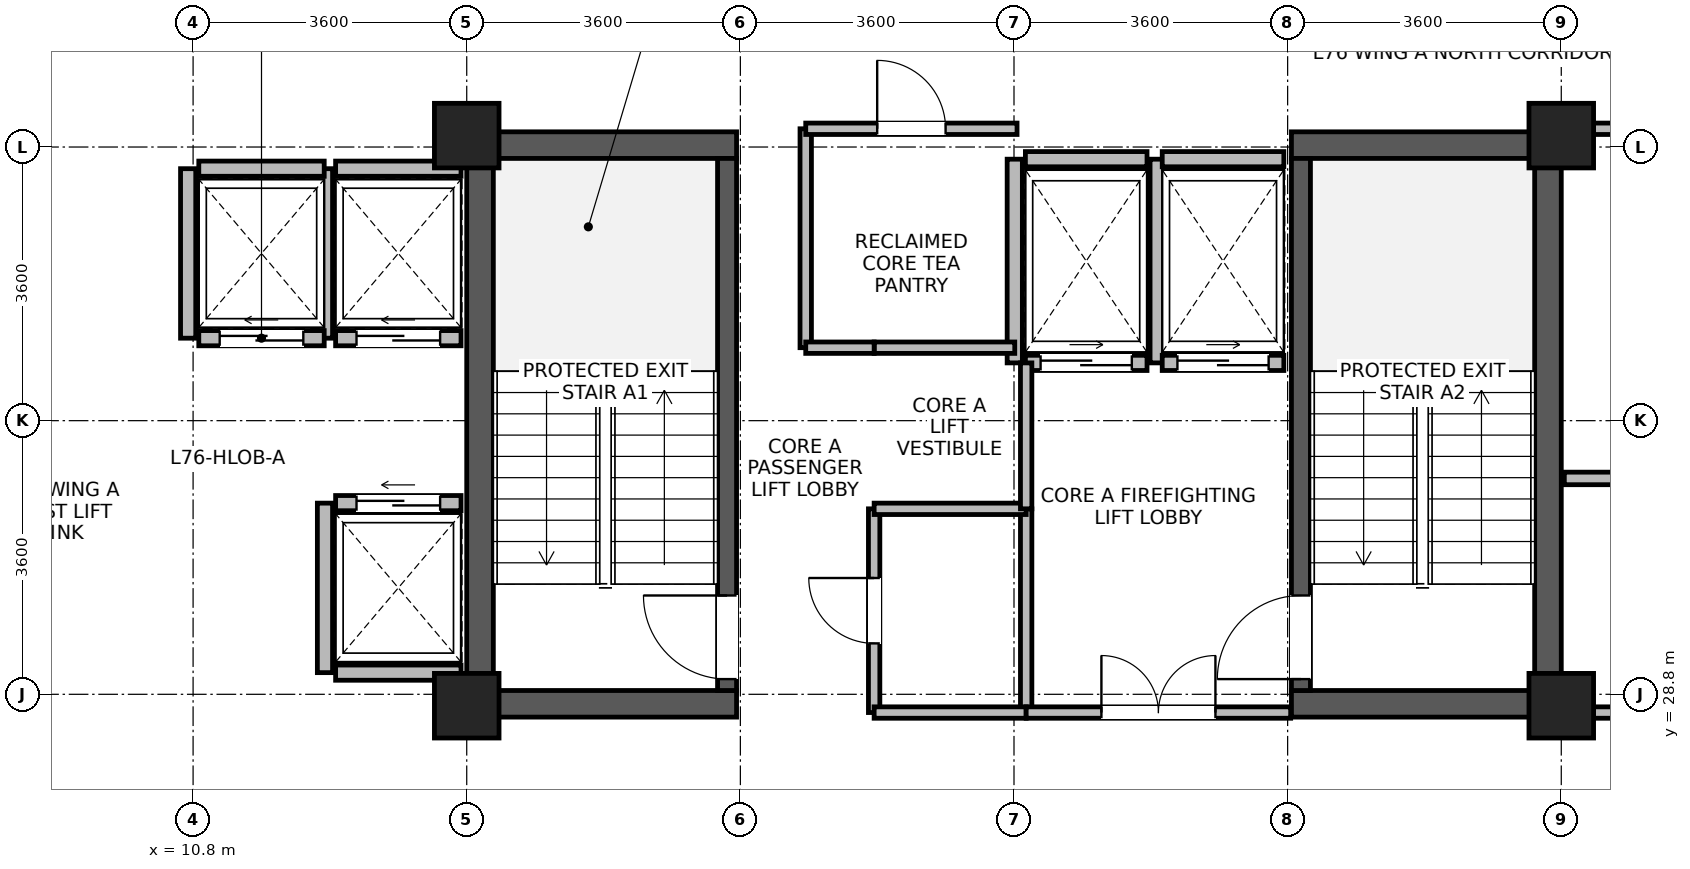
"""IFC4 building model, lengths in metres.
Left out: names, types, materials, properties, quantities, classifications, styles, units other than length and angle.
Written with IfcOpenShell. Run it as: python <this file> out.ifc"""

import sys

from ifc_helpers import new_model, si_unit, direction, frame, frame_2d, origin, origin_2d, place, context, subcontext, project, spatial, rectangle, extrude, source, transform, mapped, element, fill, save


model = new_model("IFC4")
c1 = context("Model", 3, precision=1e-05, world=origin(), true_north=direction((0.0, 1.0)))
c2 = subcontext(c1, "Body", "Model", "MODEL_VIEW")
j1 = project(units=[si_unit("LENGTHUNIT", "METRE"), si_unit("PLANEANGLEUNIT", "RADIAN")], contexts=[c1])
p1 = place(None, origin())
s1 = spatial("IfcSite", under=j1, at=p1, CompositionType="ELEMENT")
p2 = place(p1, origin())
s2 = spatial("IfcBuilding", under=s1, at=p2, CompositionType="ELEMENT")
p3 = place(p2, frame((0.0, 0.0, 294.3)))
s3 = spatial("IfcBuildingStorey", under=s2, at=p3, CompositionType="ELEMENT", Elevation=294.3)
for number, where, z_axis, x_axis in (
    (1, (14.575, 28.5, 0.0), (0.0, 0.0, 1.0), (0.0, 1.0, 0.0)),
    (2, (28.625, 28.5, 0.0), (0.0, 0.0, 1.0), (0.0, 1.0, 0.0)),
):
    element("IfcWall", number, at=place(p3, frame(where, z_axis=z_axis, x_axis=x_axis)), inside=s3, PredefinedType="SHEAR", context=c2, shape_type="SweptSolid", body=[
        extrude(rectangle(XDim=7.7, YDim=0.35, at=frame_2d((3.85, 0.0))), origin(), (0.0, 0.0, 1.0), 3.4),
    ])
for number, where, z_axis, x_axis in (
    (3, (14.75, 28.675, 0.0), (0.0, 0.0, 1.0), (1.0, 0.0, 0.0)),
    (4, (25.25, 28.675, 0.0), (0.0, 0.0, 1.0), (1.0, 0.0, 0.0)),
    (5, (14.75, 36.025, 0.0), (0.0, 0.0, 1.0), (1.0, 0.0, 0.0)),
    (6, (25.25, 36.025, 0.0), (0.0, 0.0, 1.0), (1.0, 0.0, 0.0)),
):
    element("IfcWall", number, at=place(p3, frame(where, z_axis=z_axis, x_axis=x_axis)), inside=s3, PredefinedType="SHEAR", context=c2, shape_type="SweptSolid", body=[
        extrude(rectangle(XDim=3.2, YDim=0.35, at=frame_2d((1.6, 0.0))), origin(), (0.0, 0.0, 1.0), 3.4),
    ])
p4 = place(p3, frame((17.825, 28.85, 0.0), z_axis=(0.0, 0.0, 1.0), x_axis=(0.0, 1.0, 0.0)))
e7 = element("IfcWall", 7, at=p4, inside=s3, PredefinedType="SHEAR", context=c2, shape_type="SweptSolid", body=[
    extrude(rectangle(XDim=7.0, YDim=0.25, at=frame_2d((3.5, 0.0))), origin(), (0.0, 0.0, 1.0), 3.4),
])
p5 = place(p4, frame((0.15, 0.0, 0.0)))
e8 = element("IfcOpeningElement", 8, at=p5, cuts=e7, PredefinedType="OPENING", context=c2, shape_type="SweptSolid", body=[
    extrude(rectangle(XDim=1.1, YDim=2.08, at=frame_2d((0.55, 1.04))), frame((0.0, 0.135, 0.0), z_axis=(0.0, -1.0, 0.0), x_axis=(1.0, 0.0, 0.0)), (0.0, 0.0, 1.0), 0.27),
])
p6 = place(p3, frame((25.375, 28.85, 0.0), z_axis=(0.0, 0.0, 1.0), x_axis=(0.0, 1.0, 0.0)))
e9 = element("IfcWall", 9, at=p6, inside=s3, PredefinedType="SHEAR", context=c2, shape_type="SweptSolid", body=[
    extrude(rectangle(XDim=7.0, YDim=0.25, at=frame_2d((3.5, 0.0))), origin(), (0.0, 0.0, 1.0), 3.4),
])
p7 = place(p6, frame((0.15, 0.0, 0.0)))
e10 = element("IfcOpeningElement", 10, at=p7, cuts=e9, PredefinedType="OPENING", context=c2, shape_type="SweptSolid", body=[
    extrude(rectangle(XDim=1.1, YDim=2.08, at=frame_2d((0.55, 1.04))), frame((0.0, 0.135, 0.0), z_axis=(0.0, -1.0, 0.0), x_axis=(1.0, 0.0, 0.0)), (0.0, 0.0, 1.0), 0.27),
])
m1 = source(origin(), c2, "Body", "SweptSolid", [
    extrude(rectangle(XDim=0.85, YDim=0.85, at=origin_2d()), origin(), (0.0, 0.0, 1.0), 3.7),
])
for number, where, z_axis, x_axis in (
    (11, (14.4, 28.65, 0.0), (0.0, 0.0, 1.0), (1.0, 0.0, 0.0)),
    (12, (14.4, 36.15, 0.0), (0.0, 0.0, 1.0), (1.0, 0.0, 0.0)),
    (13, (28.8, 28.65, 0.0), (0.0, 0.0, 1.0), (1.0, 0.0, 0.0)),
    (14, (28.8, 36.15, 0.0), (0.0, 0.0, 1.0), (1.0, 0.0, 0.0)),
):
    element("IfcColumn", number, at=place(p3, frame(where, z_axis=z_axis, x_axis=x_axis)), inside=s3, PredefinedType="COLUMN", context=c2, shape_type="MappedRepresentation", body=[
        mapped(m1, transform((0.0, 0.0, 0.0), x_axis=(1.0, 0.0, 0.0), y_axis=(0.0, 1.0, 0.0), z_axis=(0.0, 0.0, 1.0), scale=1.0)),
    ])
p8 = place(p3, frame((12.675, 33.485, 0.0), z_axis=(0.0, 0.0, 1.0), x_axis=(1.0, 0.0, 0.0)))
e15 = element("IfcWall", 15, at=p8, inside=s3, PredefinedType="PARTITIONING", context=c2, shape_type="SweptSolid", body=[
    extrude(rectangle(XDim=1.65, YDim=0.2, at=frame_2d((0.825, 0.0))), origin(), (0.0, 0.0, 1.0), 3.38),
])
p9 = place(p8, frame((0.275, 0.0, 0.0)))
e16 = element("IfcOpeningElement", 16, at=p9, cuts=e15, PredefinedType="OPENING", context=c2, shape_type="SweptSolid", body=[
    extrude(rectangle(XDim=1.1, YDim=2.12, at=frame_2d((0.55, 1.06))), frame((0.0, 0.11, 0.0), z_axis=(0.0, -1.0, 0.0), x_axis=(1.0, 0.0, 0.0)), (0.0, 0.0, 1.0), 0.22),
])
p10 = place(p3, frame((12.675, 35.715, 0.0), z_axis=(0.0, 0.0, 1.0), x_axis=(1.0, 0.0, 0.0)))
e17 = element("IfcWall", 17, at=p10, inside=s3, PredefinedType="PARTITIONING", context=c2, shape_type="SweptSolid", body=[
    extrude(rectangle(XDim=1.65, YDim=0.2, at=frame_2d((0.825, 0.0))), origin(), (0.0, 0.0, 1.0), 3.38),
])
p11 = place(p3, frame((12.535, 33.485, 0.0), z_axis=(0.0, 0.0, 1.0), x_axis=(0.0, 1.0, 0.0)))
e18 = element("IfcWall", 18, at=p11, inside=s3, PredefinedType="PARTITIONING", context=c2, shape_type="SweptSolid", body=[
    extrude(rectangle(XDim=2.23, YDim=0.2, at=frame_2d((1.115, 0.0))), origin(), (0.0, 0.0, 1.0), 3.38),
])
p12 = place(p3, frame((12.675, 29.085, 0.0), z_axis=(0.0, 0.0, 1.0), x_axis=(1.0, 0.0, 0.0)))
e19 = element("IfcWall", 19, at=p12, inside=s3, PredefinedType="PARTITIONING", context=c2, shape_type="SweptSolid", body=[
    extrude(rectangle(XDim=1.65, YDim=0.2, at=frame_2d((0.825, 0.0))), origin(), (0.0, 0.0, 1.0), 3.38),
])
p13 = place(p3, frame((12.675, 31.315, 0.0), z_axis=(0.0, 0.0, 1.0), x_axis=(1.0, 0.0, 0.0)))
e20 = element("IfcWall", 20, at=p13, inside=s3, PredefinedType="PARTITIONING", context=c2, shape_type="SweptSolid", body=[
    extrude(rectangle(XDim=1.65, YDim=0.2, at=frame_2d((0.825, 0.0))), origin(), (0.0, 0.0, 1.0), 3.38),
])
p14 = place(p13, frame((0.275, 0.0, 0.0)))
e21 = element("IfcOpeningElement", 21, at=p14, cuts=e20, PredefinedType="OPENING", context=c2, shape_type="SweptSolid", body=[
    extrude(rectangle(XDim=1.1, YDim=2.12, at=frame_2d((0.55, 1.06))), frame((0.0, 0.11, 0.0), z_axis=(0.0, -1.0, 0.0), x_axis=(1.0, 0.0, 0.0)), (0.0, 0.0, 1.0), 0.22),
])
p15 = place(p3, frame((12.535, 29.085, 0.0), z_axis=(0.0, 0.0, 1.0), x_axis=(0.0, 1.0, 0.0)))
e22 = element("IfcWall", 22, at=p15, inside=s3, PredefinedType="PARTITIONING", context=c2, shape_type="SweptSolid", body=[
    extrude(rectangle(XDim=2.23, YDim=0.2, at=frame_2d((1.115, 0.0))), origin(), (0.0, 0.0, 1.0), 3.38),
])
p16 = place(p3, frame((10.875, 33.485, 0.0), z_axis=(0.0, 0.0, 1.0), x_axis=(1.0, 0.0, 0.0)))
e23 = element("IfcWall", 23, at=p16, inside=s3, PredefinedType="PARTITIONING", context=c2, shape_type="SweptSolid", body=[
    extrude(rectangle(XDim=1.65, YDim=0.2, at=frame_2d((0.825, 0.0))), origin(), (0.0, 0.0, 1.0), 3.38),
])
p17 = place(p16, frame((0.275, 0.0, 0.0)))
e24 = element("IfcOpeningElement", 24, at=p17, cuts=e23, PredefinedType="OPENING", context=c2, shape_type="SweptSolid", body=[
    extrude(rectangle(XDim=1.1, YDim=2.12, at=frame_2d((0.55, 1.06))), frame((0.0, 0.11, 0.0), z_axis=(0.0, -1.0, 0.0), x_axis=(1.0, 0.0, 0.0)), (0.0, 0.0, 1.0), 0.22),
])
p18 = place(p3, frame((10.875, 35.715, 0.0), z_axis=(0.0, 0.0, 1.0), x_axis=(1.0, 0.0, 0.0)))
e25 = element("IfcWall", 25, at=p18, inside=s3, PredefinedType="PARTITIONING", context=c2, shape_type="SweptSolid", body=[
    extrude(rectangle(XDim=1.65, YDim=0.2, at=frame_2d((0.825, 0.0))), origin(), (0.0, 0.0, 1.0), 3.38),
])
p19 = place(p3, frame((10.735, 33.485, 0.0), z_axis=(0.0, 0.0, 1.0), x_axis=(0.0, 1.0, 0.0)))
e26 = element("IfcWall", 26, at=p19, inside=s3, PredefinedType="PARTITIONING", context=c2, shape_type="SweptSolid", body=[
    extrude(rectangle(XDim=2.23, YDim=0.2, at=frame_2d((1.115, 0.0))), origin(), (0.0, 0.0, 1.0), 3.38),
])
p20 = place(p3, frame((21.75, 33.16, 0.0), z_axis=(0.0, 0.0, 1.0), x_axis=(1.0, 0.0, 0.0)))
e27 = element("IfcWall", 27, at=p20, inside=s3, PredefinedType="PARTITIONING", context=c2, shape_type="SweptSolid", body=[
    extrude(rectangle(XDim=1.6, YDim=0.2, at=frame_2d((0.8, 0.0))), origin(), (0.0, 0.0, 1.0), 3.38),
])
p21 = place(p20, frame((0.2, 0.0, 0.0)))
e28 = element("IfcOpeningElement", 28, at=p21, cuts=e27, PredefinedType="OPENING", context=c2, shape_type="SweptSolid", body=[
    extrude(rectangle(XDim=1.2, YDim=2.12, at=frame_2d((0.6, 1.06))), frame((0.0, 0.11, 0.0), z_axis=(0.0, -1.0, 0.0), x_axis=(1.0, 0.0, 0.0)), (0.0, 0.0, 1.0), 0.22),
])
p22 = place(p3, frame((21.75, 35.84, 0.0), z_axis=(0.0, 0.0, 1.0), x_axis=(1.0, 0.0, 0.0)))
e29 = element("IfcWall", 29, at=p22, inside=s3, PredefinedType="PARTITIONING", context=c2, shape_type="SweptSolid", body=[
    extrude(rectangle(XDim=1.6, YDim=0.2, at=frame_2d((0.8, 0.0))), origin(), (0.0, 0.0, 1.0), 2.48),
])
for number, where, z_axis, x_axis in (
    (30, (21.61, 33.16, 0.0), (0.0, 0.0, 1.0), (0.0, 1.0, 0.0)),
    (31, (23.49, 33.16, 0.0), (0.0, 0.0, 1.0), (0.0, 1.0, 0.0)),
):
    element("IfcWall", number, at=place(p3, frame(where, z_axis=z_axis, x_axis=x_axis)), inside=s3, PredefinedType="PARTITIONING", context=c2, shape_type="SweptSolid", body=[
        extrude(rectangle(XDim=2.68, YDim=0.2, at=frame_2d((1.34, 0.0))), origin(), (0.0, 0.0, 1.0), 3.38),
    ])
p23 = place(p3, frame((23.55, 33.16, 0.0), z_axis=(0.0, 0.0, 1.0), x_axis=(1.0, 0.0, 0.0)))
e32 = element("IfcWall", 32, at=p23, inside=s3, PredefinedType="PARTITIONING", context=c2, shape_type="SweptSolid", body=[
    extrude(rectangle(XDim=1.6, YDim=0.2, at=frame_2d((0.8, 0.0))), origin(), (0.0, 0.0, 1.0), 3.38),
])
p24 = place(p23, frame((0.2, 0.0, 0.0)))
e33 = element("IfcOpeningElement", 33, at=p24, cuts=e32, PredefinedType="OPENING", context=c2, shape_type="SweptSolid", body=[
    extrude(rectangle(XDim=1.2, YDim=2.12, at=frame_2d((0.6, 1.06))), frame((0.0, 0.11, 0.0), z_axis=(0.0, -1.0, 0.0), x_axis=(1.0, 0.0, 0.0)), (0.0, 0.0, 1.0), 0.22),
])
p25 = place(p3, frame((23.55, 35.84, 0.0), z_axis=(0.0, 0.0, 1.0), x_axis=(1.0, 0.0, 0.0)))
e34 = element("IfcWall", 34, at=p25, inside=s3, PredefinedType="PARTITIONING", context=c2, shape_type="SweptSolid", body=[
    extrude(rectangle(XDim=1.6, YDim=0.2, at=frame_2d((0.8, 0.0))), origin(), (0.0, 0.0, 1.0), 2.48),
])
p26 = place(p3, frame((29.225, 28.56, 0.0), z_axis=(0.0, 0.0, 1.0), x_axis=(1.0, 0.0, 0.0)))
e35 = element("IfcWall", 35, at=p26, inside=s3, PredefinedType="PARTITIONING", context=c2, shape_type="SweptSolid", body=[
    extrude(rectangle(XDim=4.135, YDim=0.15, at=frame_2d((2.067, 0.0))), origin(), (0.0, 0.0, 1.0), 2.83),
])
p27 = place(p26, frame((1.637, 0.0, 0.0)))
e36 = element("IfcOpeningElement", 36, at=p27, cuts=e35, PredefinedType="OPENING", context=c2, shape_type="SweptSolid", body=[
    extrude(rectangle(XDim=0.86, YDim=2.02, at=frame_2d((0.43, 1.01))), frame((0.0, 0.085, 0.0), z_axis=(0.0, -1.0, 0.0), x_axis=(1.0, 0.0, 0.0)), (0.0, 0.0, 1.0), 0.17),
])
p28 = place(p3, frame((29.225, 36.24, 0.0), z_axis=(0.0, 0.0, 1.0), x_axis=(1.0, 0.0, 0.0)))
e37 = element("IfcWall", 37, at=p28, inside=s3, PredefinedType="PARTITIONING", context=c2, shape_type="SweptSolid", body=[
    extrude(rectangle(XDim=4.135, YDim=0.15, at=frame_2d((2.067, 0.0))), origin(), (0.0, 0.0, 1.0), 2.83),
])
p29 = place(p28, frame((1.417, 0.0, 0.0)))
e38 = element("IfcOpeningElement", 38, at=p29, cuts=e37, PredefinedType="OPENING", context=c2, shape_type="SweptSolid", body=[
    extrude(rectangle(XDim=1.3, YDim=2.12, at=frame_2d((0.65, 1.06))), frame((0.0, 0.085, 0.0), z_axis=(0.0, -1.0, 0.0), x_axis=(1.0, 0.0, 0.0)), (0.0, 0.0, 1.0), 0.17),
])
p30 = place(p3, frame((18.86, 33.36, 0.0), z_axis=(0.0, 0.0, 1.0), x_axis=(0.0, 1.0, 0.0)))
e39 = element("IfcWall", 39, at=p30, inside=s3, PredefinedType="PARTITIONING", context=c2, shape_type="SweptSolid", body=[
    extrude(rectangle(XDim=2.88, YDim=0.15, at=frame_2d((1.44, 0.0))), origin(), (0.0, 0.0, 1.0), 3.38),
])
p31 = place(p3, frame((18.86, 36.24, 0.0), z_axis=(0.0, 0.0, 1.0), x_axis=(1.0, 0.0, 0.0)))
e40 = element("IfcWall", 40, at=p31, inside=s3, PredefinedType="PARTITIONING", context=c2, shape_type="SweptSolid", body=[
    extrude(rectangle(XDim=2.78, YDim=0.15, at=frame_2d((1.39, 0.0))), origin(), (0.0, 0.0, 1.0), 2.48),
])
p32 = place(p31, frame((0.94, 0.0, 0.0)))
e41 = element("IfcOpeningElement", 41, at=p32, cuts=e40, PredefinedType="OPENING", context=c2, shape_type="SweptSolid", body=[
    extrude(rectangle(XDim=0.9, YDim=2.08, at=frame_2d((0.45, 1.04))), frame((0.0, 0.085, 0.0), z_axis=(0.0, -1.0, 0.0), x_axis=(1.0, 0.0, 0.0)), (0.0, 0.0, 1.0), 0.17),
])
p33 = place(p3, frame((19.76, 28.56, 0.0), z_axis=(0.0, 0.0, 1.0), x_axis=(0.0, 1.0, 0.0)))
e42 = element("IfcWall", 42, at=p33, inside=s3, PredefinedType="PARTITIONING", context=c2, shape_type="SweptSolid", body=[
    extrude(rectangle(XDim=2.68, YDim=0.15, at=frame_2d((1.34, 0.0))), origin(), (0.0, 0.0, 1.0), 3.38),
])
p34 = place(p33, frame((0.91, 0.0, 0.0)))
e43 = element("IfcOpeningElement", 43, at=p34, cuts=e42, PredefinedType="OPENING", context=c2, shape_type="SweptSolid", body=[
    extrude(rectangle(XDim=0.86, YDim=2.02, at=frame_2d((0.43, 1.01))), frame((0.0, 0.085, 0.0), z_axis=(0.0, -1.0, 0.0), x_axis=(1.0, 0.0, 0.0)), (0.0, 0.0, 1.0), 0.17),
])
p35 = place(p3, frame((21.76, 28.56, 0.0), z_axis=(0.0, 0.0, 1.0), x_axis=(0.0, 1.0, 0.0)))
e44 = element("IfcWall", 44, at=p35, inside=s3, PredefinedType="PARTITIONING", context=c2, shape_type="SweptSolid", body=[
    extrude(rectangle(XDim=2.68, YDim=0.15, at=frame_2d((1.34, 0.0))), origin(), (0.0, 0.0, 1.0), 3.38),
])
p36 = place(p3, frame((19.76, 28.56, 0.0), z_axis=(0.0, 0.0, 1.0), x_axis=(1.0, 0.0, 0.0)))
e45 = element("IfcWall", 45, at=p36, inside=s3, PredefinedType="PARTITIONING", context=c2, shape_type="SweptSolid", body=[
    extrude(rectangle(XDim=2.0, YDim=0.15, at=frame_2d((1.0, 0.0))), origin(), (0.0, 0.0, 1.0), 2.48),
])
p37 = place(p3, frame((19.76, 31.24, 0.0), z_axis=(0.0, 0.0, 1.0), x_axis=(1.0, 0.0, 0.0)))
e46 = element("IfcWall", 46, at=p37, inside=s3, PredefinedType="PARTITIONING", context=c2, shape_type="SweptSolid", body=[
    extrude(rectangle(XDim=2.0, YDim=0.15, at=frame_2d((1.0, 0.0))), origin(), (0.0, 0.0, 1.0), 3.38),
])
p38 = place(p3, frame((19.76, 33.36, 0.0), z_axis=(0.0, 0.0, 1.0), x_axis=(1.0, 0.0, 0.0)))
e47 = element("IfcWall", 47, at=p38, inside=s3, PredefinedType="PARTITIONING", context=c2, shape_type="SweptSolid", body=[
    extrude(rectangle(XDim=1.85, YDim=0.15, at=frame_2d((0.925, 0.0))), origin(), (0.0, 0.0, 1.0), 3.38),
])
p39 = place(p3, frame((18.86, 33.36, 0.0), z_axis=(0.0, 0.0, 1.0), x_axis=(1.0, 0.0, 0.0)))
e48 = element("IfcWall", 48, at=p39, inside=s3, PredefinedType="PARTITIONING", context=c2, shape_type="SweptSolid", body=[
    extrude(rectangle(XDim=0.9, YDim=0.15, at=frame_2d((0.45, 0.0))), origin(), (0.0, 0.0, 1.0), 3.38),
])
p40 = place(p3, frame((28.84, 31.64, 0.0), z_axis=(0.0, 0.0, 1.0), x_axis=(1.0, 0.0, 0.0)))
e49 = element("IfcWall", 49, at=p40, inside=s3, PredefinedType="PARTITIONING", context=c2, shape_type="SweptSolid", body=[
    extrude(rectangle(XDim=4.52, YDim=0.165, at=frame_2d((2.26, 0.0))), origin(), (0.0, 0.0, 1.0), 3.38),
])
p41 = place(p3, frame((21.76, 28.56, 0.0), z_axis=(0.0, 0.0, 1.0), x_axis=(1.0, 0.0, 0.0)))
e50 = element("IfcWall", 50, at=p41, inside=s3, PredefinedType="PARTITIONING", context=c2, shape_type="SweptSolid", body=[
    extrude(rectangle(XDim=3.48, YDim=0.15, at=frame_2d((1.74, 0.0))), origin(), (0.0, 0.0, 1.0), 2.48),
])
p42 = place(p41, frame((0.99, 0.0, 0.0)))
e51 = element("IfcOpeningElement", 51, at=p42, cuts=e50, PredefinedType="OPENING", context=c2, shape_type="SweptSolid", body=[
    extrude(rectangle(XDim=1.5, YDim=2.1, at=frame_2d((0.75, 1.05))), frame((0.0, 0.085, 0.0), z_axis=(0.0, -1.0, 0.0), x_axis=(1.0, 0.0, 0.0)), (0.0, 0.0, 1.0), 0.17),
])
p43 = place(p3, frame((21.76, 31.24, 0.0), z_axis=(0.0, 0.0, 1.0), x_axis=(0.0, 1.0, 0.0)))
e52 = element("IfcWall", 52, at=p43, inside=s3, PredefinedType="PARTITIONING", context=c2, shape_type="SweptSolid", body=[
    extrude(rectangle(XDim=1.92, YDim=0.15, at=frame_2d((0.96, 0.0))), origin(), (0.0, 0.0, 1.0), 3.38),
])
p44 = place(p5, origin())
e53 = element("IfcDoor", 53, at=p44, inside=s3, OperationType="SINGLE_SWING_RIGHT", PredefinedType="DOOR", context=c2, shape_type="SweptSolid", body=[
    extrude(rectangle(XDim=1.1, YDim=2.08, at=frame_2d((0.55, 1.04))), frame((0.0, 0.025, 0.0), z_axis=(0.0, -1.0, 0.0), x_axis=(1.0, 0.0, 0.0)), (0.0, 0.0, 1.0), 0.05),
])
fill(e8, e53)
p45 = place(p7, origin())
e54 = element("IfcDoor", 54, at=p45, inside=s3, OperationType="SINGLE_SWING_LEFT", PredefinedType="DOOR", context=c2, shape_type="SweptSolid", body=[
    extrude(rectangle(XDim=1.1, YDim=2.08, at=frame_2d((0.55, 1.04))), frame((0.0, 0.025, 0.0), z_axis=(0.0, -1.0, 0.0), x_axis=(1.0, 0.0, 0.0)), (0.0, 0.0, 1.0), 0.05),
])
fill(e10, e54)
p46 = place(p9, origin())
e55 = element("IfcDoor", 55, at=p46, inside=s3, OperationType="SLIDING_TO_LEFT", PredefinedType="DOOR", context=c2, shape_type="SweptSolid", body=[
    extrude(rectangle(XDim=1.1, YDim=2.12, at=frame_2d((0.55, 1.06))), frame((0.0, 0.025, 0.0), z_axis=(0.0, -1.0, 0.0), x_axis=(1.0, 0.0, 0.0)), (0.0, 0.0, 1.0), 0.05),
])
fill(e16, e55)
p47 = place(p14, origin())
e56 = element("IfcDoor", 56, at=p47, inside=s3, OperationType="SLIDING_TO_LEFT", PredefinedType="DOOR", context=c2, shape_type="SweptSolid", body=[
    extrude(rectangle(XDim=1.1, YDim=2.12, at=frame_2d((0.55, 1.06))), frame((0.0, 0.025, 0.0), z_axis=(0.0, -1.0, 0.0), x_axis=(1.0, 0.0, 0.0)), (0.0, 0.0, 1.0), 0.05),
])
fill(e21, e56)
p48 = place(p17, origin())
e57 = element("IfcDoor", 57, at=p48, inside=s3, OperationType="SLIDING_TO_LEFT", PredefinedType="DOOR", context=c2, shape_type="SweptSolid", body=[
    extrude(rectangle(XDim=1.1, YDim=2.12, at=frame_2d((0.55, 1.06))), frame((0.0, 0.025, 0.0), z_axis=(0.0, -1.0, 0.0), x_axis=(1.0, 0.0, 0.0)), (0.0, 0.0, 1.0), 0.05),
])
fill(e24, e57)
p49 = place(p21, origin())
e58 = element("IfcDoor", 58, at=p49, inside=s3, OperationType="SLIDING_TO_RIGHT", PredefinedType="DOOR", context=c2, shape_type="SweptSolid", body=[
    extrude(rectangle(XDim=1.2, YDim=2.12, at=frame_2d((0.6, 1.06))), frame((0.0, 0.025, 0.0), z_axis=(0.0, -1.0, 0.0), x_axis=(1.0, 0.0, 0.0)), (0.0, 0.0, 1.0), 0.05),
])
fill(e28, e58)
p50 = place(p24, origin())
e59 = element("IfcDoor", 59, at=p50, inside=s3, OperationType="SLIDING_TO_RIGHT", PredefinedType="DOOR", context=c2, shape_type="SweptSolid", body=[
    extrude(rectangle(XDim=1.2, YDim=2.12, at=frame_2d((0.6, 1.06))), frame((0.0, 0.025, 0.0), z_axis=(0.0, -1.0, 0.0), x_axis=(1.0, 0.0, 0.0)), (0.0, 0.0, 1.0), 0.05),
])
fill(e33, e59)
p51 = place(p32, origin())
e60 = element("IfcDoor", 60, at=p51, inside=s3, OperationType="SINGLE_SWING_LEFT", PredefinedType="DOOR", context=c2, shape_type="SweptSolid", body=[
    extrude(rectangle(XDim=0.9, YDim=2.08, at=frame_2d((0.45, 1.04))), frame((0.0, 0.025, 0.0), z_axis=(0.0, -1.0, 0.0), x_axis=(1.0, 0.0, 0.0)), (0.0, 0.0, 1.0), 0.05),
])
fill(e41, e60)
p52 = place(p34, origin())
e61 = element("IfcDoor", 61, at=p52, inside=s3, OperationType="SINGLE_SWING_RIGHT", PredefinedType="DOOR", context=c2, shape_type="SweptSolid", body=[
    extrude(rectangle(XDim=0.86, YDim=2.02, at=frame_2d((0.43, 1.01))), frame((0.0, 0.025, 0.0), z_axis=(0.0, -1.0, 0.0), x_axis=(1.0, 0.0, 0.0)), (0.0, 0.0, 1.0), 0.05),
])
fill(e43, e61)
p53 = place(p42, origin())
e62 = element("IfcDoor", 62, at=p53, inside=s3, OperationType="DOUBLE_DOOR_SINGLE_SWING", PredefinedType="DOOR", context=c2, shape_type="SweptSolid", body=[
    extrude(rectangle(XDim=1.5, YDim=2.1, at=frame_2d((0.75, 1.05))), frame((0.0, 0.025, 0.0), z_axis=(0.0, -1.0, 0.0), x_axis=(1.0, 0.0, 0.0)), (0.0, 0.0, 1.0), 0.05),
])
fill(e51, e62)
save(model, sys.argv[1])
